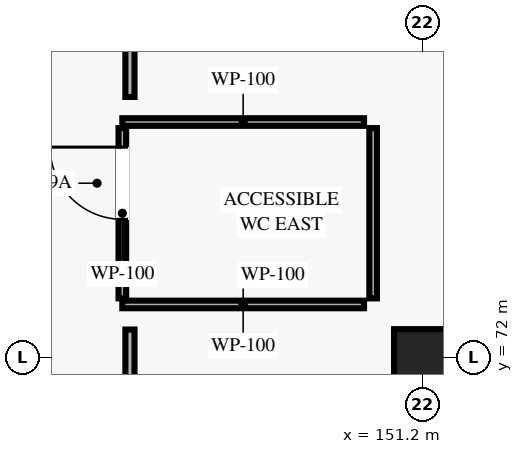
"""IFC4 building model, lengths in metres.
Left out: names, types, materials, properties, quantities, classifications, styles, units other than length and angle.
Written with IfcOpenShell. Run it as: python <this file> out.ifc"""

import sys

from ifc_helpers import new_model, si_unit, direction, frame, frame_2d, origin, origin_2d, place, context, subcontext, project, spatial, rectangle, extrude, element, fill, save


model = new_model("IFC4")
c1 = context("Model", 3, precision=1e-05, world=origin(), true_north=direction((0.0, 1.0)))
c2 = subcontext(c1, "Body", "Model", "MODEL_VIEW")
j1 = project(units=[si_unit("LENGTHUNIT", "METRE"), si_unit("PLANEANGLEUNIT", "RADIAN")], contexts=[c1])
p1 = place(None, origin())
s1 = spatial("IfcSite", under=j1, at=p1, CompositionType="ELEMENT")
p2 = place(p1, origin())
s2 = spatial("IfcBuilding", under=s1, at=p2, CompositionType="ELEMENT")
p3 = place(p2, frame((0.0, 0.0, 9.45)))
s3 = spatial("IfcBuildingStorey", under=s2, at=p3, CompositionType="ELEMENT", Elevation=9.45)
p4 = place(p3, frame((151.2, 72.0, 0.0), z_axis=(0.0, 0.0, 1.0), x_axis=(1.0, 0.0, 0.0)))
e1 = element("IfcColumn", 1, at=p4, inside=s3, PredefinedType="COLUMN", context=c2, shape_type="SweptSolid", body=[
    extrude(rectangle(XDim=0.75, YDim=0.75, at=origin_2d()), origin(), (0.0, 0.0, 1.0), 4.05),
])
p5 = place(p3, frame((147.25, 72.78, 0.0), z_axis=(0.0, 0.0, 1.0), x_axis=(0.0, 1.0, 0.0)))
e2 = element("IfcWall", 2, at=p5, inside=s3, PredefinedType="PARTITIONING", context=c2, shape_type="SweptSolid", body=[
    extrude(rectangle(XDim=2.24, YDim=0.1, at=frame_2d((1.12, 0.0))), origin(), (0.0, 0.0, 1.0), 3.81),
])
p6 = place(p5, frame((1.04, 0.0, 0.0)))
e3 = element("IfcOpeningElement", 3, at=p6, cuts=e2, PredefinedType="OPENING", context=c2, shape_type="SweptSolid", body=[
    extrude(rectangle(XDim=0.95, YDim=2.1, at=frame_2d((0.475, 1.05))), frame((0.0, 0.06, 0.0), z_axis=(0.0, -1.0, 0.0), x_axis=(1.0, 0.0, 0.0)), (0.0, 0.0, 1.0), 0.12),
])
for number, where, z_axis, x_axis in (
    (4, (147.25, 72.7, 0.0), (0.0, 0.0, 1.0), (1.0, 0.0, 0.0)),
    (5, (147.25, 75.1, 0.0), (0.0, 0.0, 1.0), (1.0, 0.0, 0.0)),
):
    element("IfcWall", number, at=place(p3, frame(where, z_axis=z_axis, x_axis=x_axis)), inside=s3, PredefinedType="PARTITIONING", context=c2, shape_type="SweptSolid", body=[
        extrude(rectangle(XDim=3.18, YDim=0.1, at=frame_2d((1.59, 0.0))), origin(), (0.0, 0.0, 1.0), 3.81),
    ])
p7 = place(p3, frame((150.55, 72.78, 0.0), z_axis=(0.0, 0.0, 1.0), x_axis=(0.0, 1.0, 0.0)))
e6 = element("IfcWall", 6, at=p7, inside=s3, PredefinedType="PARTITIONING", context=c2, shape_type="SweptSolid", body=[
    extrude(rectangle(XDim=2.24, YDim=0.1, at=frame_2d((1.12, 0.0))), origin(), (0.0, 0.0, 1.0), 3.81),
])
p8 = place(p3, frame((147.35, 57.15, 0.0), z_axis=(0.0, 0.0, 1.0), x_axis=(0.0, 1.0, 0.0)))
e7 = element("IfcWall", 7, at=p8, inside=s3, PredefinedType="PARTITIONING", context=c2, shape_type="SweptSolid", body=[
    extrude(rectangle(XDim=15.22, YDim=0.12, at=frame_2d((7.61, 0.0))), origin(), (0.0, 0.0, 1.0), 3.81),
])
p9 = place(p8, frame((3.255, 0.0, 0.0)))
e8 = element("IfcOpeningElement", 8, at=p9, cuts=e7, PredefinedType="OPENING", context=c2, shape_type="SweptSolid", body=[
    extrude(rectangle(XDim=1.7, YDim=2.2, at=frame_2d((0.85, 1.1))), frame((0.0, 0.07, 0.0), z_axis=(0.0, -1.0, 0.0), x_axis=(1.0, 0.0, 0.0)), (0.0, 0.0, 1.0), 0.14),
])
p10 = place(p3, frame((147.35, 75.43, 0.0), z_axis=(0.0, 0.0, 1.0), x_axis=(0.0, 1.0, 0.0)))
e9 = element("IfcWall", 9, at=p10, inside=s3, PredefinedType="PARTITIONING", context=c2, shape_type="SweptSolid", body=[
    extrude(rectangle(XDim=13.07, YDim=0.12, at=frame_2d((6.535, 0.0))), origin(), (0.0, 0.0, 1.0), 3.81),
])
p11 = place(p6, origin())
e10 = element("IfcDoor", 10, at=p11, inside=s3, OperationType="SINGLE_SWING_RIGHT", PredefinedType="DOOR", context=c2, shape_type="SweptSolid", body=[
    extrude(rectangle(XDim=0.95, YDim=2.1, at=frame_2d((0.475, 1.05))), frame((0.0, 0.025, 0.0), z_axis=(0.0, -1.0, 0.0), x_axis=(1.0, 0.0, 0.0)), (0.0, 0.0, 1.0), 0.05),
])
fill(e3, e10)
save(model, sys.argv[1])
